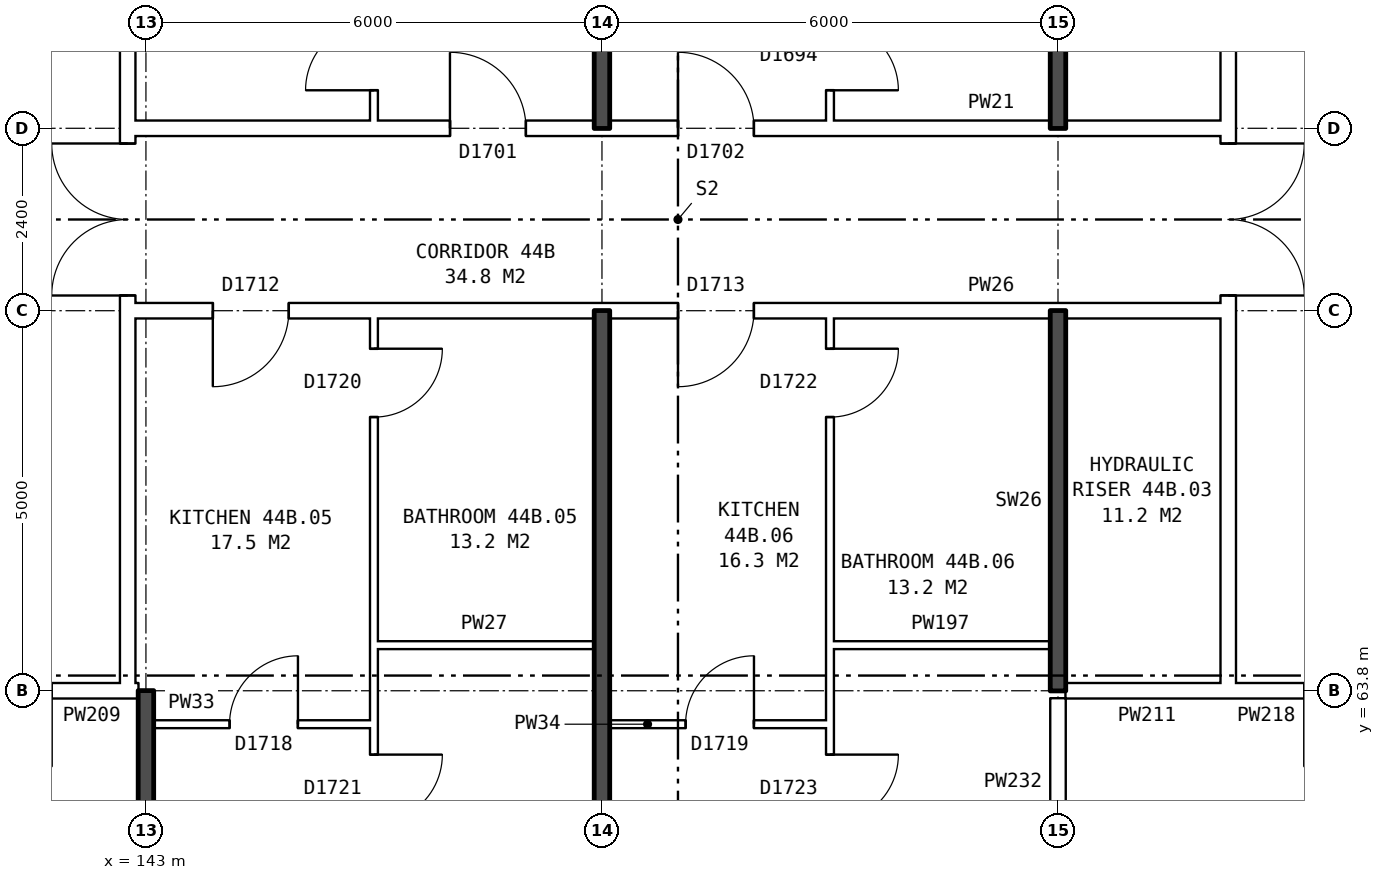
"""IFC4 building model, lengths in metres.
Left out: names, types, materials, properties, quantities, classifications, styles, units other than length and angle.
Written with IfcOpenShell. Run it as: python <this file> out.ifc"""

import sys

from ifc_helpers import new_model, si_unit, direction, frame, frame_2d, origin, place, context, subcontext, project, spatial, rectangle, extrude, element, fill, save


model = new_model("IFC4")
c1 = context("Model", 3, precision=1e-05, world=origin(), true_north=direction((0.0, 1.0)))
c2 = subcontext(c1, "Body", "Model", "MODEL_VIEW")
j1 = project(units=[si_unit("LENGTHUNIT", "METRE"), si_unit("PLANEANGLEUNIT", "RADIAN")], contexts=[c1])
p1 = place(None, origin())
s1 = spatial("IfcSite", under=j1, at=p1, CompositionType="ELEMENT")
p2 = place(p1, origin())
s2 = spatial("IfcBuilding", under=s1, at=p2, CompositionType="ELEMENT")
p3 = place(p2, frame((0.0, 0.0, 157.8)))
s3 = spatial("IfcBuildingStorey", under=s2, at=p3, CompositionType="ELEMENT", Elevation=157.8)
p4 = place(p3, frame((142.76, 63.9, 0.0), z_axis=(0.0, 0.0, 1.0), x_axis=(0.0, 1.0, 0.0)))
e1 = element("IfcWall", 1, at=p4, inside=s3, PredefinedType="PARTITIONING", context=c2, shape_type="SweptSolid", body=[
    extrude(rectangle(XDim=12.2, YDim=0.2, at=frame_2d((6.1, 0.0))), origin(), (0.0, 0.0, 1.0), 2.85),
])
p5 = place(p4, frame((5.1, 0.0, 0.0)))
e2 = element("IfcOpeningElement", 2, at=p5, cuts=e1, PredefinedType="OPENING", context=c2, shape_type="SweptSolid", body=[
    extrude(rectangle(XDim=2.0, YDim=2.1, at=frame_2d((1.0, 1.05))), frame((0.0, 0.11, 0.0), z_axis=(0.0, -1.0, 0.0), x_axis=(1.0, 0.0, 0.0)), (0.0, 0.0, 1.0), 0.22),
])
p6 = place(p3, frame((157.24, 63.9, 0.0), z_axis=(0.0, 0.0, 1.0), x_axis=(0.0, 1.0, 0.0)))
e3 = element("IfcWall", 3, at=p6, inside=s3, PredefinedType="PARTITIONING", context=c2, shape_type="SweptSolid", body=[
    extrude(rectangle(XDim=12.2, YDim=0.2, at=frame_2d((6.1, 0.0))), origin(), (0.0, 0.0, 1.0), 2.85),
])
p7 = place(p6, frame((5.1, 0.0, 0.0)))
e4 = element("IfcOpeningElement", 4, at=p7, cuts=e3, PredefinedType="OPENING", context=c2, shape_type="SweptSolid", body=[
    extrude(rectangle(XDim=2.0, YDim=2.1, at=frame_2d((1.0, 1.05))), frame((0.0, 0.11, 0.0), z_axis=(0.0, -1.0, 0.0), x_axis=(1.0, 0.0, 0.0)), (0.0, 0.0, 1.0), 0.22),
])
p8 = place(p3, frame((143.1, 63.36, 0.0), z_axis=(0.0, 0.0, 1.0), x_axis=(1.0, 0.0, 0.0)))
e5 = element("IfcWall", 5, at=p8, inside=s3, PredefinedType="PARTITIONING", context=c2, shape_type="SweptSolid", body=[
    extrude(rectangle(XDim=2.9, YDim=0.1, at=frame_2d((1.45, 0.0))), origin(), (0.0, 0.0, 1.0), 2.85),
])
p9 = place(p8, frame((1.0, 0.0, 0.0)))
e6 = element("IfcOpeningElement", 6, at=p9, cuts=e5, PredefinedType="OPENING", context=c2, shape_type="SweptSolid", body=[
    extrude(rectangle(XDim=0.9, YDim=2.1, at=frame_2d((0.45, 1.05))), frame((0.0, 0.06, 0.0), z_axis=(0.0, -1.0, 0.0), x_axis=(1.0, 0.0, 0.0)), (0.0, 0.0, 1.0), 0.12),
])
p10 = place(p3, frame((149.1, 63.36, 0.0), z_axis=(0.0, 0.0, 1.0), x_axis=(1.0, 0.0, 0.0)))
e7 = element("IfcWall", 7, at=p10, inside=s3, PredefinedType="PARTITIONING", context=c2, shape_type="SweptSolid", body=[
    extrude(rectangle(XDim=2.9, YDim=0.1, at=frame_2d((1.45, 0.0))), origin(), (0.0, 0.0, 1.0), 2.85),
])
p11 = place(p10, frame((1.0, 0.0, 0.0)))
e8 = element("IfcOpeningElement", 8, at=p11, cuts=e7, PredefinedType="OPENING", context=c2, shape_type="SweptSolid", body=[
    extrude(rectangle(XDim=0.9, YDim=2.1, at=frame_2d((0.45, 1.05))), frame((0.0, 0.06, 0.0), z_axis=(0.0, -1.0, 0.0), x_axis=(1.0, 0.0, 0.0)), (0.0, 0.0, 1.0), 0.12),
])
p12 = place(p3, frame((139.76, 63.8, 0.0), z_axis=(0.0, 0.0, 1.0), x_axis=(1.0, 0.0, 0.0)))
e9 = element("IfcWall", 9, at=p12, inside=s3, PredefinedType="PARTITIONING", context=c2, shape_type="SweptSolid", body=[
    extrude(rectangle(XDim=3.0, YDim=0.2, at=frame_2d((1.5, 0.0))), origin(), (0.0, 0.0, 1.0), 2.85),
])
p13 = place(p12, frame((1.0, 0.0, 0.0)))
e10 = element("IfcOpeningElement", 10, at=p13, cuts=e9, PredefinedType="OPENING", context=c2, shape_type="SweptSolid", body=[
    extrude(rectangle(XDim=1.0, YDim=2.1, at=frame_2d((0.5, 1.05))), frame((0.0, 0.11, 0.0), z_axis=(0.0, -1.0, 0.0), x_axis=(1.0, 0.0, 0.0)), (0.0, 0.0, 1.0), 0.22),
])
p14 = place(p3, frame((142.76, 63.8, 0.0), z_axis=(0.0, 0.0, 1.0), x_axis=(1.0, 0.0, 0.0)))
e11 = element("IfcWall", 11, at=p14, inside=s3, PredefinedType="PARTITIONING", context=c2, shape_type="SweptSolid", body=[
    extrude(rectangle(XDim=0.14, YDim=0.2, at=frame_2d((0.07, 0.0))), origin(), (0.0, 0.0, 1.0), 2.85),
])
p15 = place(p3, frame((155.1, 63.8, 0.0), z_axis=(0.0, 0.0, 1.0), x_axis=(1.0, 0.0, 0.0)))
e12 = element("IfcWall", 12, at=p15, inside=s3, PredefinedType="PARTITIONING", context=c2, shape_type="SweptSolid", body=[
    extrude(rectangle(XDim=2.14, YDim=0.2, at=frame_2d((1.07, 0.0))), origin(), (0.0, 0.0, 1.0), 2.85),
])
p16 = place(p3, frame((157.24, 63.8, 0.0), z_axis=(0.0, 0.0, 1.0), x_axis=(1.0, 0.0, 0.0)))
e13 = element("IfcWall", 13, at=p16, inside=s3, PredefinedType="PARTITIONING", context=c2, shape_type="SweptSolid", body=[
    extrude(rectangle(XDim=3.0, YDim=0.2, at=frame_2d((1.5, 0.0))), origin(), (0.0, 0.0, 1.0), 2.85),
])
p17 = place(p16, frame((1.0, 0.0, 0.0)))
e14 = element("IfcOpeningElement", 14, at=p17, cuts=e13, PredefinedType="OPENING", context=c2, shape_type="SweptSolid", body=[
    extrude(rectangle(XDim=1.0, YDim=2.1, at=frame_2d((0.5, 1.05))), frame((0.0, 0.11, 0.0), z_axis=(0.0, -1.0, 0.0), x_axis=(1.0, 0.0, 0.0)), (0.0, 0.0, 1.0), 0.22),
])
for number, where, z_axis, x_axis in (
    (15, (146.0, 64.4, 0.0), (0.0, 0.0, 1.0), (1.0, 0.0, 0.0)),
    (16, (152.0, 64.4, 0.0), (0.0, 0.0, 1.0), (1.0, 0.0, 0.0)),
):
    element("IfcWall", number, at=place(p3, frame(where, z_axis=z_axis, x_axis=x_axis)), inside=s3, PredefinedType="PARTITIONING", context=c2, shape_type="SweptSolid", body=[
        extrude(rectangle(XDim=2.9, YDim=0.1, at=frame_2d((1.45, 0.0))), origin(), (0.0, 0.0, 1.0), 2.85),
    ])
p18 = place(p3, frame((142.76, 68.8, 0.0), z_axis=(0.0, 0.0, 1.0), x_axis=(1.0, 0.0, 0.0)))
e17 = element("IfcWall", 17, at=p18, inside=s3, PredefinedType="PARTITIONING", context=c2, shape_type="SweptSolid", body=[
    extrude(rectangle(XDim=14.48, YDim=0.2, at=frame_2d((7.24, 0.0))), origin(), (0.0, 0.0, 1.0), 2.85),
])
p19 = place(p18, frame((1.12, 0.0, 0.0)))
e18 = element("IfcOpeningElement", 18, at=p19, cuts=e17, PredefinedType="OPENING", context=c2, shape_type="SweptSolid", body=[
    extrude(rectangle(XDim=1.0, YDim=2.1, at=frame_2d((0.5, 1.05))), frame((0.0, 0.11, 0.0), z_axis=(0.0, -1.0, 0.0), x_axis=(1.0, 0.0, 0.0)), (0.0, 0.0, 1.0), 0.22),
])
p20 = place(p18, frame((7.24, 0.0, 0.0)))
e19 = element("IfcOpeningElement", 19, at=p20, cuts=e17, PredefinedType="OPENING", context=c2, shape_type="SweptSolid", body=[
    extrude(rectangle(XDim=1.0, YDim=2.1, at=frame_2d((0.5, 1.05))), frame((0.0, 0.11, 0.0), z_axis=(0.0, -1.0, 0.0), x_axis=(1.0, 0.0, 0.0)), (0.0, 0.0, 1.0), 0.22),
])
p21 = place(p3, frame((142.76, 71.2, 0.0), z_axis=(0.0, 0.0, 1.0), x_axis=(1.0, 0.0, 0.0)))
e20 = element("IfcWall", 20, at=p21, inside=s3, PredefinedType="PARTITIONING", context=c2, shape_type="SweptSolid", body=[
    extrude(rectangle(XDim=14.48, YDim=0.2, at=frame_2d((7.24, 0.0))), origin(), (0.0, 0.0, 1.0), 2.85),
])
p22 = place(p21, frame((4.24, 0.0, 0.0)))
e21 = element("IfcOpeningElement", 21, at=p22, cuts=e20, PredefinedType="OPENING", context=c2, shape_type="SweptSolid", body=[
    extrude(rectangle(XDim=1.0, YDim=2.1, at=frame_2d((0.5, 1.05))), frame((0.0, 0.11, 0.0), z_axis=(0.0, -1.0, 0.0), x_axis=(1.0, 0.0, 0.0)), (0.0, 0.0, 1.0), 0.22),
])
p23 = place(p21, frame((7.24, 0.0, 0.0)))
e22 = element("IfcOpeningElement", 22, at=p23, cuts=e20, PredefinedType="OPENING", context=c2, shape_type="SweptSolid", body=[
    extrude(rectangle(XDim=1.0, YDim=2.1, at=frame_2d((0.5, 1.05))), frame((0.0, 0.11, 0.0), z_axis=(0.0, -1.0, 0.0), x_axis=(1.0, 0.0, 0.0)), (0.0, 0.0, 1.0), 0.22),
])
p24 = place(p3, frame((143.0, 54.36, 0.0), z_axis=(0.0, 0.0, 1.0), x_axis=(0.0, 1.0, 0.0)))
e23 = element("IfcWall", 23, at=p24, inside=s3, PredefinedType="SOLIDWALL", context=c2, shape_type="SweptSolid", body=[
    extrude(rectangle(XDim=9.44, YDim=0.2, at=frame_2d((4.72, 0.0))), origin(), (0.0, 0.0, 1.0), 2.85),
])
p25 = place(p3, frame((146.0, 54.36, 0.0), z_axis=(0.0, 0.0, 1.0), x_axis=(0.0, 1.0, 0.0)))
e24 = element("IfcWall", 24, at=p25, inside=s3, PredefinedType="PARTITIONING", context=c2, shape_type="SweptSolid", body=[
    extrude(rectangle(XDim=14.34, YDim=0.1, at=frame_2d((7.17, 0.0))), origin(), (0.0, 0.0, 1.0), 2.85),
])
p26 = place(p25, frame((7.7, 0.0, 0.0)))
e25 = element("IfcOpeningElement", 25, at=p26, cuts=e24, PredefinedType="OPENING", context=c2, shape_type="SweptSolid", body=[
    extrude(rectangle(XDim=0.9, YDim=2.1, at=frame_2d((0.45, 1.05))), frame((0.0, 0.06, 0.0), z_axis=(0.0, -1.0, 0.0), x_axis=(1.0, 0.0, 0.0)), (0.0, 0.0, 1.0), 0.12),
])
p27 = place(p25, frame((13.04, 0.0, 0.0)))
e26 = element("IfcOpeningElement", 26, at=p27, cuts=e24, PredefinedType="OPENING", context=c2, shape_type="SweptSolid", body=[
    extrude(rectangle(XDim=0.9, YDim=2.1, at=frame_2d((0.45, 1.05))), frame((0.0, 0.06, 0.0), z_axis=(0.0, -1.0, 0.0), x_axis=(1.0, 0.0, 0.0)), (0.0, 0.0, 1.0), 0.12),
])
p28 = place(p3, frame((146.0, 71.3, 0.0), z_axis=(0.0, 0.0, 1.0), x_axis=(0.0, 1.0, 0.0)))
e27 = element("IfcWall", 27, at=p28, inside=s3, PredefinedType="PARTITIONING", context=c2, shape_type="SweptSolid", body=[
    extrude(rectangle(XDim=14.34, YDim=0.1, at=frame_2d((7.17, 0.0))), origin(), (0.0, 0.0, 1.0), 2.85),
])
p29 = place(p28, frame((9.24, 0.0, 0.0)))
e28 = element("IfcOpeningElement", 28, at=p29, cuts=e27, PredefinedType="OPENING", context=c2, shape_type="SweptSolid", body=[
    extrude(rectangle(XDim=0.9, YDim=2.1, at=frame_2d((0.45, 1.05))), frame((0.0, 0.06, 0.0), z_axis=(0.0, -1.0, 0.0), x_axis=(1.0, 0.0, 0.0)), (0.0, 0.0, 1.0), 0.12),
])
p30 = place(p28, frame((0.4, 0.0, 0.0)))
e29 = element("IfcOpeningElement", 29, at=p30, cuts=e27, PredefinedType="OPENING", context=c2, shape_type="SweptSolid", body=[
    extrude(rectangle(XDim=0.9, YDim=2.1, at=frame_2d((0.45, 1.05))), frame((0.0, 0.06, 0.0), z_axis=(0.0, -1.0, 0.0), x_axis=(1.0, 0.0, 0.0)), (0.0, 0.0, 1.0), 0.12),
])
for number, where, z_axis, x_axis in (
    (30, (149.0, 54.36, 0.0), (0.0, 0.0, 1.0), (0.0, 1.0, 0.0)),
    (31, (149.0, 71.2, 0.0), (0.0, 0.0, 1.0), (0.0, 1.0, 0.0)),
):
    element("IfcWall", number, at=place(p3, frame(where, z_axis=z_axis, x_axis=x_axis)), inside=s3, PredefinedType="SOLIDWALL", context=c2, shape_type="SweptSolid", body=[
        extrude(rectangle(XDim=14.44, YDim=0.2, at=frame_2d((7.22, 0.0))), origin(), (0.0, 0.0, 1.0), 2.85),
    ])
p31 = place(p3, frame((152.0, 54.36, 0.0), z_axis=(0.0, 0.0, 1.0), x_axis=(0.0, 1.0, 0.0)))
e32 = element("IfcWall", 32, at=p31, inside=s3, PredefinedType="PARTITIONING", context=c2, shape_type="SweptSolid", body=[
    extrude(rectangle(XDim=14.34, YDim=0.1, at=frame_2d((7.17, 0.0))), origin(), (0.0, 0.0, 1.0), 2.85),
])
p32 = place(p31, frame((7.7, 0.0, 0.0)))
e33 = element("IfcOpeningElement", 33, at=p32, cuts=e32, PredefinedType="OPENING", context=c2, shape_type="SweptSolid", body=[
    extrude(rectangle(XDim=0.9, YDim=2.1, at=frame_2d((0.45, 1.05))), frame((0.0, 0.06, 0.0), z_axis=(0.0, -1.0, 0.0), x_axis=(1.0, 0.0, 0.0)), (0.0, 0.0, 1.0), 0.12),
])
p33 = place(p31, frame((13.04, 0.0, 0.0)))
e34 = element("IfcOpeningElement", 34, at=p33, cuts=e32, PredefinedType="OPENING", context=c2, shape_type="SweptSolid", body=[
    extrude(rectangle(XDim=0.9, YDim=2.1, at=frame_2d((0.45, 1.05))), frame((0.0, 0.06, 0.0), z_axis=(0.0, -1.0, 0.0), x_axis=(1.0, 0.0, 0.0)), (0.0, 0.0, 1.0), 0.12),
])
p34 = place(p3, frame((152.0, 71.3, 0.0), z_axis=(0.0, 0.0, 1.0), x_axis=(0.0, 1.0, 0.0)))
e35 = element("IfcWall", 35, at=p34, inside=s3, PredefinedType="PARTITIONING", context=c2, shape_type="SweptSolid", body=[
    extrude(rectangle(XDim=14.34, YDim=0.1, at=frame_2d((7.17, 0.0))), origin(), (0.0, 0.0, 1.0), 2.85),
])
p35 = place(p34, frame((9.24, 0.0, 0.0)))
e36 = element("IfcOpeningElement", 36, at=p35, cuts=e35, PredefinedType="OPENING", context=c2, shape_type="SweptSolid", body=[
    extrude(rectangle(XDim=0.9, YDim=2.1, at=frame_2d((0.45, 1.05))), frame((0.0, 0.06, 0.0), z_axis=(0.0, -1.0, 0.0), x_axis=(1.0, 0.0, 0.0)), (0.0, 0.0, 1.0), 0.12),
])
p36 = place(p34, frame((0.4, 0.0, 0.0)))
e37 = element("IfcOpeningElement", 37, at=p36, cuts=e35, PredefinedType="OPENING", context=c2, shape_type="SweptSolid", body=[
    extrude(rectangle(XDim=0.9, YDim=2.1, at=frame_2d((0.45, 1.05))), frame((0.0, 0.06, 0.0), z_axis=(0.0, -1.0, 0.0), x_axis=(1.0, 0.0, 0.0)), (0.0, 0.0, 1.0), 0.12),
])
p37 = place(p3, frame((155.0, 61.5, 0.0), z_axis=(0.0, 0.0, 1.0), x_axis=(0.0, 1.0, 0.0)))
e38 = element("IfcWall", 38, at=p37, inside=s3, PredefinedType="PARTITIONING", context=c2, shape_type="SweptSolid", body=[
    extrude(rectangle(XDim=2.2, YDim=0.2, at=frame_2d((1.1, 0.0))), origin(), (0.0, 0.0, 1.0), 2.85),
])
for number, where, z_axis, x_axis in (
    (39, (155.0, 63.8, 0.0), (0.0, 0.0, 1.0), (0.0, 1.0, 0.0)),
    (40, (155.0, 71.2, 0.0), (0.0, 0.0, 1.0), (0.0, 1.0, 0.0)),
):
    element("IfcWall", number, at=place(p3, frame(where, z_axis=z_axis, x_axis=x_axis)), inside=s3, PredefinedType="SOLIDWALL", context=c2, shape_type="SweptSolid", body=[
        extrude(rectangle(XDim=5.0, YDim=0.2, at=frame_2d((2.5, 0.0))), origin(), (0.0, 0.0, 1.0), 2.85),
    ])
p38 = place(p5, origin())
e41 = element("IfcDoor", 41, at=p38, inside=s3, OperationType="DOUBLE_DOOR_SINGLE_SWING", PredefinedType="DOOR", context=c2, shape_type="SweptSolid", body=[
    extrude(rectangle(XDim=2.0, YDim=2.1, at=frame_2d((1.0, 1.05))), frame((0.0, 0.025, 0.0), z_axis=(0.0, -1.0, 0.0), x_axis=(1.0, 0.0, 0.0)), (0.0, 0.0, 1.0), 0.05),
])
fill(e2, e41)
p39 = place(p7, frame((2.0, 0.0, 0.0), z_axis=(0.0, 0.0, 1.0), x_axis=(-1.0, 0.0, 0.0)))
e42 = element("IfcDoor", 42, at=p39, inside=s3, OperationType="DOUBLE_DOOR_SINGLE_SWING", PredefinedType="DOOR", context=c2, shape_type="SweptSolid", body=[
    extrude(rectangle(XDim=2.0, YDim=2.1, at=frame_2d((1.0, 1.05))), frame((0.0, 0.025, 0.0), z_axis=(0.0, -1.0, 0.0), x_axis=(1.0, 0.0, 0.0)), (0.0, 0.0, 1.0), 0.05),
])
fill(e4, e42)
p40 = place(p26, frame((0.9, 0.0, 0.0), z_axis=(0.0, 0.0, 1.0), x_axis=(-1.0, 0.0, 0.0)))
e43 = element("IfcDoor", 43, at=p40, inside=s3, OperationType="SINGLE_SWING_LEFT", PredefinedType="DOOR", context=c2, shape_type="SweptSolid", body=[
    extrude(rectangle(XDim=0.9, YDim=2.1, at=frame_2d((0.45, 1.05))), frame((0.0, 0.025, 0.0), z_axis=(0.0, -1.0, 0.0), x_axis=(1.0, 0.0, 0.0)), (0.0, 0.0, 1.0), 0.05),
])
fill(e25, e43)
p41 = place(p19, frame((1.0, 0.0, 0.0), z_axis=(0.0, 0.0, 1.0), x_axis=(-1.0, 0.0, 0.0)))
e44 = element("IfcDoor", 44, at=p41, inside=s3, OperationType="SINGLE_SWING_RIGHT", PredefinedType="DOOR", context=c2, shape_type="SweptSolid", body=[
    extrude(rectangle(XDim=1.0, YDim=2.1, at=frame_2d((0.5, 1.05))), frame((0.0, 0.025, 0.0), z_axis=(0.0, -1.0, 0.0), x_axis=(1.0, 0.0, 0.0)), (0.0, 0.0, 1.0), 0.05),
])
fill(e18, e44)
p42 = place(p9, origin())
e45 = element("IfcDoor", 45, at=p42, inside=s3, OperationType="SINGLE_SWING_RIGHT", PredefinedType="DOOR", context=c2, shape_type="SweptSolid", body=[
    extrude(rectangle(XDim=0.9, YDim=2.1, at=frame_2d((0.45, 1.05))), frame((0.0, 0.025, 0.0), z_axis=(0.0, -1.0, 0.0), x_axis=(1.0, 0.0, 0.0)), (0.0, 0.0, 1.0), 0.05),
])
fill(e6, e45)
p43 = place(p27, frame((0.9, 0.0, 0.0), z_axis=(0.0, 0.0, 1.0), x_axis=(-1.0, 0.0, 0.0)))
e46 = element("IfcDoor", 46, at=p43, inside=s3, OperationType="SINGLE_SWING_LEFT", PredefinedType="DOOR", context=c2, shape_type="SweptSolid", body=[
    extrude(rectangle(XDim=0.9, YDim=2.1, at=frame_2d((0.45, 1.05))), frame((0.0, 0.025, 0.0), z_axis=(0.0, -1.0, 0.0), x_axis=(1.0, 0.0, 0.0)), (0.0, 0.0, 1.0), 0.05),
])
fill(e26, e46)
p44 = place(p32, frame((0.9, 0.0, 0.0), z_axis=(0.0, 0.0, 1.0), x_axis=(-1.0, 0.0, 0.0)))
e47 = element("IfcDoor", 47, at=p44, inside=s3, OperationType="SINGLE_SWING_LEFT", PredefinedType="DOOR", context=c2, shape_type="SweptSolid", body=[
    extrude(rectangle(XDim=0.9, YDim=2.1, at=frame_2d((0.45, 1.05))), frame((0.0, 0.025, 0.0), z_axis=(0.0, -1.0, 0.0), x_axis=(1.0, 0.0, 0.0)), (0.0, 0.0, 1.0), 0.05),
])
fill(e33, e47)
p45 = place(p20, frame((1.0, 0.0, 0.0), z_axis=(0.0, 0.0, 1.0), x_axis=(-1.0, 0.0, 0.0)))
e48 = element("IfcDoor", 48, at=p45, inside=s3, OperationType="SINGLE_SWING_RIGHT", PredefinedType="DOOR", context=c2, shape_type="SweptSolid", body=[
    extrude(rectangle(XDim=1.0, YDim=2.1, at=frame_2d((0.5, 1.05))), frame((0.0, 0.025, 0.0), z_axis=(0.0, -1.0, 0.0), x_axis=(1.0, 0.0, 0.0)), (0.0, 0.0, 1.0), 0.05),
])
fill(e19, e48)
p46 = place(p11, origin())
e49 = element("IfcDoor", 49, at=p46, inside=s3, OperationType="SINGLE_SWING_RIGHT", PredefinedType="DOOR", context=c2, shape_type="SweptSolid", body=[
    extrude(rectangle(XDim=0.9, YDim=2.1, at=frame_2d((0.45, 1.05))), frame((0.0, 0.025, 0.0), z_axis=(0.0, -1.0, 0.0), x_axis=(1.0, 0.0, 0.0)), (0.0, 0.0, 1.0), 0.05),
])
fill(e8, e49)
p47 = place(p33, frame((0.9, 0.0, 0.0), z_axis=(0.0, 0.0, 1.0), x_axis=(-1.0, 0.0, 0.0)))
e50 = element("IfcDoor", 50, at=p47, inside=s3, OperationType="SINGLE_SWING_LEFT", PredefinedType="DOOR", context=c2, shape_type="SweptSolid", body=[
    extrude(rectangle(XDim=0.9, YDim=2.1, at=frame_2d((0.45, 1.05))), frame((0.0, 0.025, 0.0), z_axis=(0.0, -1.0, 0.0), x_axis=(1.0, 0.0, 0.0)), (0.0, 0.0, 1.0), 0.05),
])
fill(e34, e50)
p48 = place(p22, origin())
e51 = element("IfcDoor", 51, at=p48, inside=s3, OperationType="SINGLE_SWING_LEFT", PredefinedType="DOOR", context=c2, shape_type="SweptSolid", body=[
    extrude(rectangle(XDim=1.0, YDim=2.1, at=frame_2d((0.5, 1.05))), frame((0.0, 0.025, 0.0), z_axis=(0.0, -1.0, 0.0), x_axis=(1.0, 0.0, 0.0)), (0.0, 0.0, 1.0), 0.05),
])
fill(e21, e51)
p49 = place(p30, origin())
e52 = element("IfcDoor", 52, at=p49, inside=s3, OperationType="SINGLE_SWING_LEFT", PredefinedType="DOOR", context=c2, shape_type="SweptSolid", body=[
    extrude(rectangle(XDim=0.9, YDim=2.1, at=frame_2d((0.45, 1.05))), frame((0.0, 0.025, 0.0), z_axis=(0.0, -1.0, 0.0), x_axis=(1.0, 0.0, 0.0)), (0.0, 0.0, 1.0), 0.05),
])
fill(e29, e52)
p50 = place(p23, origin())
e53 = element("IfcDoor", 53, at=p50, inside=s3, OperationType="SINGLE_SWING_LEFT", PredefinedType="DOOR", context=c2, shape_type="SweptSolid", body=[
    extrude(rectangle(XDim=1.0, YDim=2.1, at=frame_2d((0.5, 1.05))), frame((0.0, 0.025, 0.0), z_axis=(0.0, -1.0, 0.0), x_axis=(1.0, 0.0, 0.0)), (0.0, 0.0, 1.0), 0.05),
])
fill(e22, e53)
p51 = place(p36, frame((0.9, 0.0, 0.0), z_axis=(0.0, 0.0, 1.0), x_axis=(-1.0, 0.0, 0.0)))
e54 = element("IfcDoor", 54, at=p51, inside=s3, OperationType="SINGLE_SWING_RIGHT", PredefinedType="DOOR", context=c2, shape_type="SweptSolid", body=[
    extrude(rectangle(XDim=0.9, YDim=2.1, at=frame_2d((0.45, 1.05))), frame((0.0, 0.025, 0.0), z_axis=(0.0, -1.0, 0.0), x_axis=(1.0, 0.0, 0.0)), (0.0, 0.0, 1.0), 0.05),
])
fill(e37, e54)
save(model, sys.argv[1])
